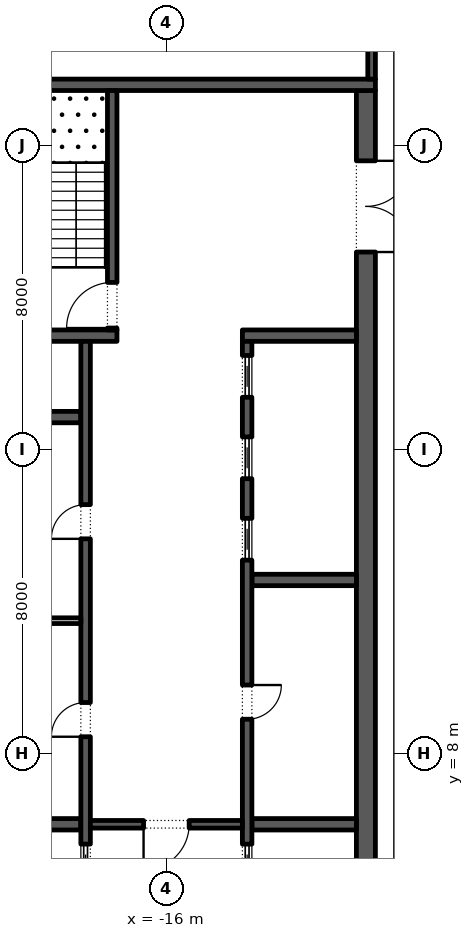
"""IFC4 building model, lengths in metres.
Left out: names, types, materials, properties, quantities, classifications, styles, units other than length and angle.
Written with IfcOpenShell. Run it as: python <this file> out.ifc"""

import sys

from ifc_helpers import new_model, si_unit, direction, frame, frame_2d, origin, place, context, subcontext, project, spatial, rectangle, extrude, element, fill, save


model = new_model("IFC4")
c1 = context("Model", 3, precision=1e-05, world=origin(), true_north=direction((0.0, 1.0)))
c2 = subcontext(c1, "Body", "Model", "MODEL_VIEW")
j1 = project(units=[si_unit("LENGTHUNIT", "METRE"), si_unit("PLANEANGLEUNIT", "RADIAN")], contexts=[c1])
p1 = place(None, origin())
s1 = spatial("IfcSite", under=j1, at=p1, CompositionType="ELEMENT")
p2 = place(p1, origin())
s2 = spatial("IfcBuilding", under=s1, at=p2, CompositionType="ELEMENT")
p3 = place(p2, frame((0.0, 0.0, 309.0)))
s3 = spatial("IfcBuildingStorey", under=s2, at=p3, CompositionType="ELEMENT", Elevation=309.0)
p4 = place(p3, frame((-10.75, -2.45, 0.0), z_axis=(0.0, 0.0, 1.0), x_axis=(0.0, 1.0, 0.0)))
e1 = element("IfcWall", 1, at=p4, inside=s3, PredefinedType="SHEAR", context=c2, shape_type="SweptSolid", body=[
    extrude(rectangle(XDim=27.9, YDim=0.5, at=frame_2d((13.95, 0.0))), origin(), (0.0, 0.0, 1.0), 4.0),
])
p5 = place(p4, frame((23.65, 0.0, 0.0)))
e2 = element("IfcOpeningElement", 2, at=p5, cuts=e1, PredefinedType="OPENING", context=c2, shape_type="SweptSolid", body=[
    extrude(rectangle(XDim=2.4, YDim=2.1, at=frame_2d((1.2, 1.05))), frame((0.0, 0.26, 0.0), z_axis=(0.0, -1.0, 0.0), x_axis=(1.0, 0.0, 0.0)), (0.0, 0.0, 1.0), 0.52),
])
p6 = place(p4, frame((0.788, 0.0, 0.0)))
e3 = element("IfcOpeningElement", 3, at=p6, cuts=e1, PredefinedType="OPENING", context=c2, shape_type="SweptSolid", body=[
    extrude(rectangle(XDim=0.9, YDim=2.1, at=frame_2d((0.45, 1.05))), frame((0.0, 0.26, 0.0), z_axis=(0.0, -1.0, 0.0), x_axis=(1.0, 0.0, 0.0)), (0.0, 0.0, 1.0), 0.52),
])
p7 = place(p4, frame((3.962, 0.0, 0.0)))
e4 = element("IfcOpeningElement", 4, at=p7, cuts=e1, PredefinedType="OPENING", context=c2, shape_type="SweptSolid", body=[
    extrude(rectangle(XDim=1.0, YDim=2.1, at=frame_2d((0.5, 1.05))), frame((0.0, 0.26, 0.0), z_axis=(0.0, -1.0, 0.0), x_axis=(1.0, 0.0, 0.0)), (0.0, 0.0, 1.0), 0.52),
])
p8 = place(p3, frame((-21.5, 25.6, 0.0), z_axis=(0.0, 0.0, 1.0), x_axis=(1.0, 0.0, 0.0)))
e5 = element("IfcWall", 5, at=p8, inside=s3, PredefinedType="SHEAR", context=c2, shape_type="SweptSolid", body=[
    extrude(rectangle(XDim=11.0, YDim=0.3, at=frame_2d((5.5, 0.0))), origin(), (0.0, 0.0, 1.0), 4.0),
])
p9 = place(p3, frame((-21.0, 19.0, 0.0), z_axis=(0.0, 0.0, 1.0), x_axis=(1.0, 0.0, 0.0)))
e6 = element("IfcWall", 6, at=p9, inside=s3, PredefinedType="SHEAR", context=c2, shape_type="SweptSolid", body=[
    extrude(rectangle(XDim=3.7, YDim=0.3, at=frame_2d((1.85, 0.0))), origin(), (0.0, 0.0, 1.0), 4.0),
])
p10 = place(p3, frame((-17.425, 19.15, 0.0), z_axis=(0.0, 0.0, 1.0), x_axis=(0.0, 1.0, 0.0)))
e7 = element("IfcWall", 7, at=p10, inside=s3, PredefinedType="SHEAR", context=c2, shape_type="SweptSolid", body=[
    extrude(rectangle(XDim=6.3, YDim=0.25, at=frame_2d((3.15, 0.0))), origin(), (0.0, 0.0, 1.0), 4.0),
])
p11 = place(p10, frame((0.05, 0.0, 0.0)))
e8 = element("IfcOpeningElement", 8, at=p11, cuts=e7, PredefinedType="OPENING", context=c2, shape_type="SweptSolid", body=[
    extrude(rectangle(XDim=1.2, YDim=2.1, at=frame_2d((0.6, 1.05))), frame((0.0, 0.135, 0.0), z_axis=(0.0, -1.0, 0.0), x_axis=(1.0, 0.0, 0.0)), (0.0, 0.0, 1.0), 0.27),
])
for number, where, z_axis, x_axis in (
    (9, (-21.0, 6.143, 0.0), (0.0, 0.0, 1.0), (1.0, 0.0, 0.0)),
    (10, (-21.0, 16.857, 0.0), (0.0, 0.0, 1.0), (1.0, 0.0, 0.0)),
):
    element("IfcWall", number, at=place(p3, frame(where, z_axis=z_axis, x_axis=x_axis)), inside=s3, PredefinedType="SHEAR", context=c2, shape_type="SweptSolid", body=[
        extrude(rectangle(XDim=2.75, YDim=0.3, at=frame_2d((1.375, 0.0))), origin(), (0.0, 0.0, 1.0), 4.0),
    ])
p12 = place(p3, frame((-18.125, 4.15, 0.0), z_axis=(0.0, 0.0, 1.0), x_axis=(0.0, 1.0, 0.0)))
e11 = element("IfcWall", 11, at=p12, inside=s3, PredefinedType="SHEAR", context=c2, shape_type="SweptSolid", body=[
    extrude(rectangle(XDim=14.7, YDim=0.25, at=frame_2d((7.35, 0.0))), origin(), (0.0, 0.0, 1.0), 4.0),
])
p13 = place(p12, frame((4.296, 0.0, 0.0)))
e12 = element("IfcOpeningElement", 12, at=p13, cuts=e11, PredefinedType="OPENING", context=c2, shape_type="SweptSolid", body=[
    extrude(rectangle(XDim=0.9, YDim=2.1, at=frame_2d((0.45, 1.05))), frame((0.0, 0.135, 0.0), z_axis=(0.0, -1.0, 0.0), x_axis=(1.0, 0.0, 0.0)), (0.0, 0.0, 1.0), 0.27),
])
p14 = place(p12, frame((9.504, 0.0, 0.0)))
e13 = element("IfcOpeningElement", 13, at=p14, cuts=e11, PredefinedType="OPENING", context=c2, shape_type="SweptSolid", body=[
    extrude(rectangle(XDim=0.9, YDim=2.1, at=frame_2d((0.45, 1.05))), frame((0.0, 0.135, 0.0), z_axis=(0.0, -1.0, 0.0), x_axis=(1.0, 0.0, 0.0)), (0.0, 0.0, 1.0), 0.27),
])
p15 = place(p12, frame((0.371, 0.0, 0.0)))
e14 = element("IfcOpeningElement", 14, at=p15, cuts=e11, PredefinedType="OPENING", context=c2, shape_type="SweptSolid", body=[
    extrude(rectangle(XDim=1.1, YDim=2.1, at=frame_2d((0.55, 1.05))), frame((0.0, 0.135, 0.0), z_axis=(0.0, -1.0, 0.0), x_axis=(1.0, 0.0, 0.0)), (0.0, 0.0, 1.0), 0.27),
])
p16 = place(p3, frame((-21.0, 11.5, 0.0), z_axis=(0.0, 0.0, 1.0), x_axis=(1.0, 0.0, 0.0)))
e15 = element("IfcWall", 15, at=p16, inside=s3, PredefinedType="PARTITIONING", context=c2, shape_type="SweptSolid", body=[
    extrude(rectangle(XDim=2.75, YDim=0.15, at=frame_2d((1.375, 0.0))), origin(), (0.0, 0.0, 1.0), 4.0),
])
for number, where, z_axis, x_axis in (
    (16, (-13.75, 6.143, 0.0), (0.0, 0.0, 1.0), (1.0, 0.0, 0.0)),
    (17, (-13.75, 12.571, 0.0), (0.0, 0.0, 1.0), (1.0, 0.0, 0.0)),
):
    element("IfcWall", number, at=place(p3, frame(where, z_axis=z_axis, x_axis=x_axis)), inside=s3, PredefinedType="SHEAR", context=c2, shape_type="SweptSolid", body=[
        extrude(rectangle(XDim=2.75, YDim=0.3, at=frame_2d((1.375, 0.0))), origin(), (0.0, 0.0, 1.0), 4.0),
    ])
p17 = place(p3, frame((-14.0, 19.0, 0.0), z_axis=(0.0, 0.0, 1.0), x_axis=(1.0, 0.0, 0.0)))
e18 = element("IfcWall", 18, at=p17, inside=s3, PredefinedType="SHEAR", context=c2, shape_type="SweptSolid", body=[
    extrude(rectangle(XDim=3.0, YDim=0.3, at=frame_2d((1.5, 0.0))), origin(), (0.0, 0.0, 1.0), 4.0),
])
p18 = place(p3, frame((-13.875, -2.45, 0.0), z_axis=(0.0, 0.0, 1.0), x_axis=(0.0, 1.0, 0.0)))
e19 = element("IfcWall", 19, at=p18, inside=s3, PredefinedType="SHEAR", context=c2, shape_type="SweptSolid", body=[
    extrude(rectangle(XDim=21.3, YDim=0.25, at=frame_2d((10.65, 0.0))), origin(), (0.0, 0.0, 1.0), 4.0),
])
p19 = place(p18, frame((11.357, 0.0, 0.0)))
e20 = element("IfcOpeningElement", 20, at=p19, cuts=e19, PredefinedType="OPENING", context=c2, shape_type="SweptSolid", body=[
    extrude(rectangle(XDim=0.9, YDim=2.1, at=frame_2d((0.45, 1.05))), frame((0.0, 0.135, 0.0), z_axis=(0.0, -1.0, 0.0), x_axis=(1.0, 0.0, 0.0)), (0.0, 0.0, 1.0), 0.27),
])
p20 = place(p18, frame((6.971, 0.0, 0.0)))
e21 = element("IfcOpeningElement", 21, at=p20, cuts=e19, PredefinedType="OPENING", context=c2, shape_type="SweptSolid", body=[
    extrude(rectangle(XDim=1.1, YDim=2.1, at=frame_2d((0.55, 1.05))), frame((0.0, 0.135, 0.0), z_axis=(0.0, -1.0, 0.0), x_axis=(1.0, 0.0, 0.0)), (0.0, 0.0, 1.0), 0.27),
])
p21 = place(p18, frame((15.543, 0.0, 0.0)))
e22 = element("IfcOpeningElement", 22, at=p21, cuts=e19, PredefinedType="OPENING", context=c2, shape_type="SweptSolid", body=[
    extrude(rectangle(XDim=1.1, YDim=2.1, at=frame_2d((0.55, 1.05))), frame((0.0, 0.135, 0.0), z_axis=(0.0, -1.0, 0.0), x_axis=(1.0, 0.0, 0.0)), (0.0, 0.0, 1.0), 0.27),
])
p22 = place(p18, frame((17.686, 0.0, 0.0)))
e23 = element("IfcOpeningElement", 23, at=p22, cuts=e19, PredefinedType="OPENING", context=c2, shape_type="SweptSolid", body=[
    extrude(rectangle(XDim=1.1, YDim=2.1, at=frame_2d((0.55, 1.05))), frame((0.0, 0.135, 0.0), z_axis=(0.0, -1.0, 0.0), x_axis=(1.0, 0.0, 0.0)), (0.0, 0.0, 1.0), 0.27),
])
p23 = place(p18, frame((19.829, 0.0, 0.0)))
e24 = element("IfcOpeningElement", 24, at=p23, cuts=e19, PredefinedType="OPENING", context=c2, shape_type="SweptSolid", body=[
    extrude(rectangle(XDim=1.1, YDim=2.1, at=frame_2d((0.55, 1.05))), frame((0.0, 0.135, 0.0), z_axis=(0.0, -1.0, 0.0), x_axis=(1.0, 0.0, 0.0)), (0.0, 0.0, 1.0), 0.27),
])
p24 = place(p3, frame((-18.0, 6.143, 0.0), z_axis=(0.0, 0.0, 1.0), x_axis=(1.0, 0.0, 0.0)))
e25 = element("IfcWall", 25, at=p24, inside=s3, PredefinedType="SHEAR", context=c2, shape_type="SweptSolid", body=[
    extrude(rectangle(XDim=4.0, YDim=0.2, at=frame_2d((2.0, 0.0))), origin(), (0.0, 0.0, 1.0), 4.0),
])
p25 = place(p24, frame((1.4, 0.0, 0.0)))
e26 = element("IfcOpeningElement", 26, at=p25, cuts=e25, PredefinedType="OPENING", context=c2, shape_type="SweptSolid", body=[
    extrude(rectangle(XDim=1.2, YDim=2.1, at=frame_2d((0.6, 1.05))), frame((0.0, 0.11, 0.0), z_axis=(0.0, -1.0, 0.0), x_axis=(1.0, 0.0, 0.0)), (0.0, 0.0, 1.0), 0.22),
])
p26 = place(p3, frame((-10.6, 25.75, 0.0), z_axis=(0.0, 0.0, 1.0), x_axis=(0.0, 1.0, 0.0)))
e27 = element("IfcWall", 27, at=p26, inside=s3, PredefinedType="SHEAR", context=c2, shape_type="SweptSolid", body=[
    extrude(rectangle(XDim=15.05, YDim=0.2, at=frame_2d((7.525, 0.0))), origin(), (0.0, 0.0, 1.0), 4.0),
])
p27 = place(p26, frame((7.075, 0.0, 0.0)))
e28 = element("IfcOpeningElement", 28, at=p27, cuts=e27, PredefinedType="OPENING", context=c2, shape_type="SweptSolid", body=[
    extrude(rectangle(XDim=0.9, YDim=2.1, at=frame_2d((0.45, 1.05))), frame((0.0, 0.11, 0.0), z_axis=(0.0, -1.0, 0.0), x_axis=(1.0, 0.0, 0.0)), (0.0, 0.0, 1.0), 0.22),
])
p28 = place(p13, origin())
e29 = element("IfcDoor", 29, at=p28, inside=s3, OperationType="SINGLE_SWING_RIGHT", PredefinedType="DOOR", context=c2, shape_type="SweptSolid", body=[
    extrude(rectangle(XDim=0.9, YDim=2.1, at=frame_2d((0.45, 1.05))), frame((0.0, 0.125, 0.0), z_axis=(0.0, -1.0, 0.0), x_axis=(1.0, 0.0, 0.0)), (0.0, 0.0, 1.0), 0.05),
])
fill(e12, e29)
p29 = place(p14, origin())
e30 = element("IfcDoor", 30, at=p29, inside=s3, OperationType="SINGLE_SWING_RIGHT", PredefinedType="DOOR", context=c2, shape_type="SweptSolid", body=[
    extrude(rectangle(XDim=0.9, YDim=2.1, at=frame_2d((0.45, 1.05))), frame((0.0, 0.125, 0.0), z_axis=(0.0, -1.0, 0.0), x_axis=(1.0, 0.0, 0.0)), (0.0, 0.0, 1.0), 0.05),
])
fill(e13, e30)
p30 = place(p15, origin())
e31 = element("IfcDoor", 31, at=p30, inside=s3, OperationType="SLIDING_TO_LEFT", PredefinedType="DOOR", context=c2, shape_type="SweptSolid", body=[
    extrude(rectangle(XDim=1.1, YDim=2.1, at=frame_2d((0.55, 1.05))), frame((0.0, 0.025, 0.0), z_axis=(0.0, -1.0, 0.0), x_axis=(1.0, 0.0, 0.0)), (0.0, 0.0, 1.0), 0.05),
])
fill(e14, e31)
p31 = place(p19, frame((0.9, -0.2, 0.0), z_axis=(0.0, 0.0, 1.0), x_axis=(-1.0, 0.0, 0.0)))
e32 = element("IfcDoor", 32, at=p31, inside=s3, OperationType="SINGLE_SWING_RIGHT", PredefinedType="DOOR", context=c2, shape_type="SweptSolid", body=[
    extrude(rectangle(XDim=0.9, YDim=2.1, at=frame_2d((0.45, 1.05))), frame((0.0, -0.075, 0.0), z_axis=(0.0, -1.0, 0.0), x_axis=(1.0, 0.0, 0.0)), (0.0, 0.0, 1.0), 0.05),
])
fill(e20, e32)
p32 = place(p20, origin())
e33 = element("IfcDoor", 33, at=p32, inside=s3, OperationType="SLIDING_TO_LEFT", PredefinedType="DOOR", context=c2, shape_type="SweptSolid", body=[
    extrude(rectangle(XDim=1.1, YDim=2.1, at=frame_2d((0.55, 1.05))), frame((0.0, 0.025, 0.0), z_axis=(0.0, -1.0, 0.0), x_axis=(1.0, 0.0, 0.0)), (0.0, 0.0, 1.0), 0.05),
])
fill(e21, e33)
p33 = place(p21, origin())
e34 = element("IfcDoor", 34, at=p33, inside=s3, OperationType="SLIDING_TO_LEFT", PredefinedType="DOOR", context=c2, shape_type="SweptSolid", body=[
    extrude(rectangle(XDim=1.1, YDim=2.1, at=frame_2d((0.55, 1.05))), frame((0.0, 0.025, 0.0), z_axis=(0.0, -1.0, 0.0), x_axis=(1.0, 0.0, 0.0)), (0.0, 0.0, 1.0), 0.05),
])
fill(e22, e34)
p34 = place(p22, origin())
e35 = element("IfcDoor", 35, at=p34, inside=s3, OperationType="SLIDING_TO_LEFT", PredefinedType="DOOR", context=c2, shape_type="SweptSolid", body=[
    extrude(rectangle(XDim=1.1, YDim=2.1, at=frame_2d((0.55, 1.05))), frame((0.0, 0.025, 0.0), z_axis=(0.0, -1.0, 0.0), x_axis=(1.0, 0.0, 0.0)), (0.0, 0.0, 1.0), 0.05),
])
fill(e23, e35)
p35 = place(p23, origin())
e36 = element("IfcDoor", 36, at=p35, inside=s3, OperationType="SLIDING_TO_LEFT", PredefinedType="DOOR", context=c2, shape_type="SweptSolid", body=[
    extrude(rectangle(XDim=1.1, YDim=2.1, at=frame_2d((0.55, 1.05))), frame((0.0, 0.025, 0.0), z_axis=(0.0, -1.0, 0.0), x_axis=(1.0, 0.0, 0.0)), (0.0, 0.0, 1.0), 0.05),
])
fill(e24, e36)
p36 = place(p25, frame((1.2, 0.0, 0.0), z_axis=(0.0, 0.0, 1.0), x_axis=(-1.0, 0.0, 0.0)))
e37 = element("IfcDoor", 37, at=p36, inside=s3, OperationType="SINGLE_SWING_LEFT", PredefinedType="DOOR", context=c2, shape_type="SweptSolid", body=[
    extrude(rectangle(XDim=1.2, YDim=2.1, at=frame_2d((0.6, 1.05))), frame((0.0, 0.025, 0.0), z_axis=(0.0, -1.0, 0.0), x_axis=(1.0, 0.0, 0.0)), (0.0, 0.0, 1.0), 0.05),
])
fill(e26, e37)
p37 = place(p5, frame((2.4, 0.0, 0.0), z_axis=(0.0, 0.0, 1.0), x_axis=(-1.0, 0.0, 0.0)))
e38 = element("IfcDoor", 38, at=p37, inside=s3, OperationType="DOUBLE_DOOR_SINGLE_SWING", PredefinedType="DOOR", context=c2, shape_type="SweptSolid", body=[
    extrude(rectangle(XDim=2.4, YDim=2.1, at=frame_2d((1.2, 1.05))), frame((0.0, 0.025, 0.0), z_axis=(0.0, -1.0, 0.0), x_axis=(1.0, 0.0, 0.0)), (0.0, 0.0, 1.0), 0.05),
])
fill(e2, e38)
p38 = place(p11, origin())
e39 = element("IfcDoor", 39, at=p38, inside=s3, OperationType="SINGLE_SWING_RIGHT", PredefinedType="DOOR", context=c2, shape_type="SweptSolid", body=[
    extrude(rectangle(XDim=1.2, YDim=2.1, at=frame_2d((0.6, 1.05))), frame((0.0, 0.025, 0.0), z_axis=(0.0, -1.0, 0.0), x_axis=(1.0, 0.0, 0.0)), (0.0, 0.0, 1.0), 0.05),
])
fill(e8, e39)
save(model, sys.argv[1])
